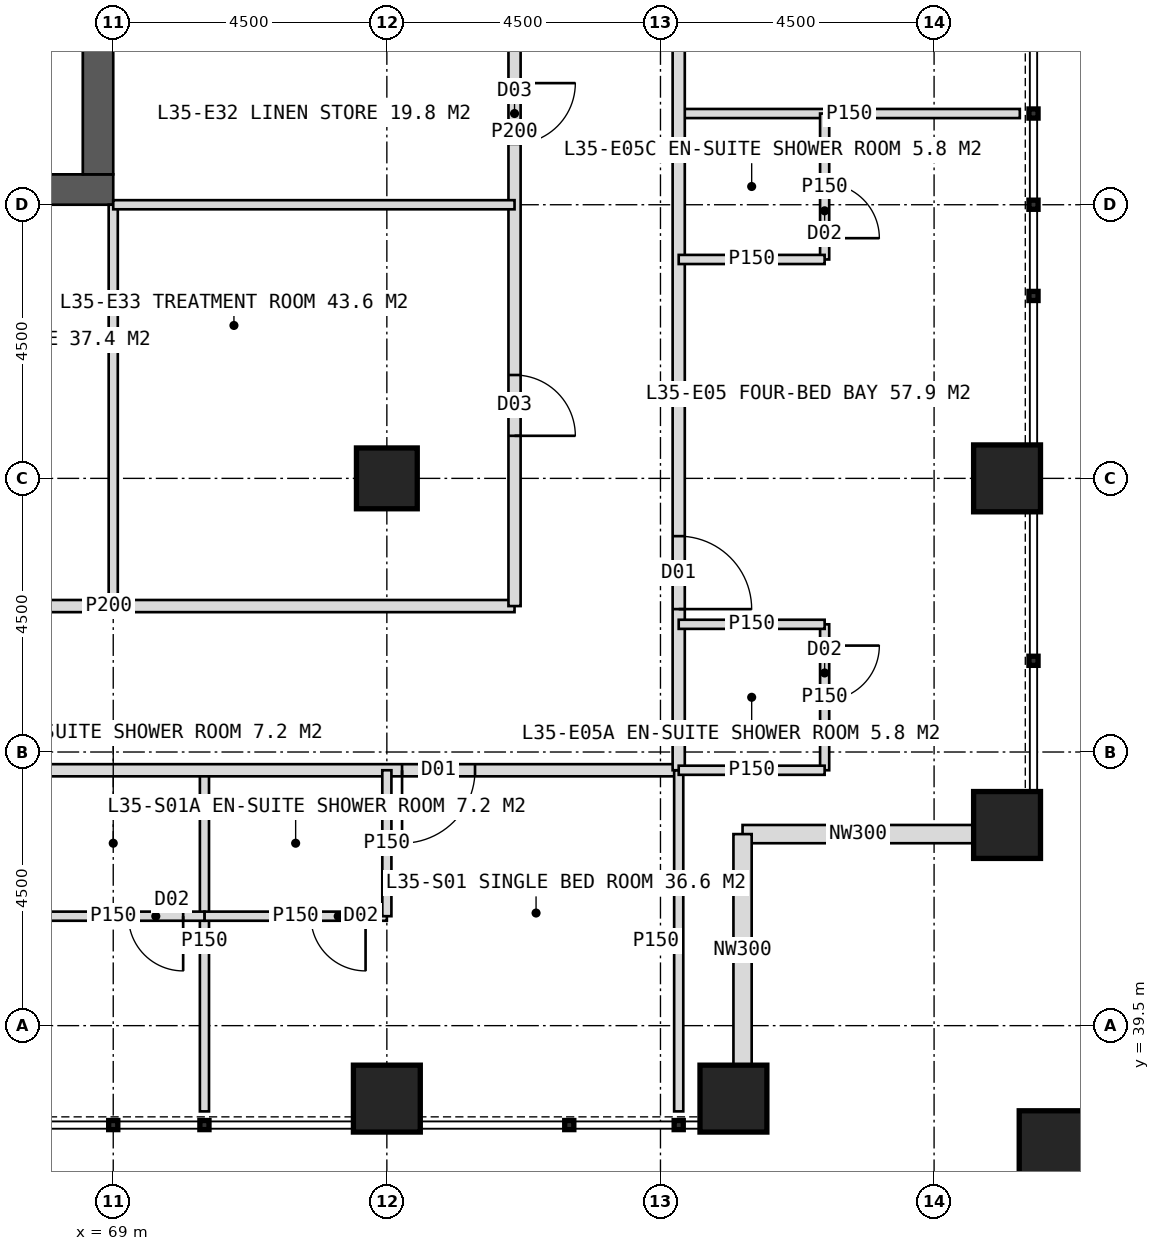
"""IFC4 building model, lengths in metres.
Left out: names, types, materials, properties, quantities, classifications, styles, units other than length and angle.
Written with IfcOpenShell. Run it as: python <this file> out.ifc"""

import sys

from ifc_helpers import new_model, si_unit, direction, frame, frame_2d, origin, origin_2d, place, context, subcontext, project, spatial, rectangle, hollow_rectangle, extrude, element, fill, save


model = new_model("IFC4")
c1 = context("Model", 3, precision=1e-05, world=origin(), true_north=direction((0.0, 1.0)))
c2 = subcontext(c1, "Body", "Model", "MODEL_VIEW")
j1 = project(units=[si_unit("LENGTHUNIT", "METRE"), si_unit("PLANEANGLEUNIT", "RADIAN")], contexts=[c1])
p1 = place(None, origin())
s1 = spatial("IfcSite", under=j1, at=p1, CompositionType="ELEMENT")
p2 = place(p1, origin())
s2 = spatial("IfcBuilding", under=s1, at=p2, CompositionType="ELEMENT")
p3 = place(p2, frame((0.0, 0.0, 148.0)))
s3 = spatial("IfcBuildingStorey", under=s2, at=p3, CompositionType="ELEMENT", Elevation=148.0)
p4 = place(p3, frame((51.0, 53.25, 0.0), z_axis=(0.0, 0.0, 1.0), x_axis=(1.0, 0.0, 0.0)))
e1 = element("IfcWall", 1, at=p4, inside=s3, PredefinedType="SHEAR", context=c2, shape_type="SweptSolid", body=[
    extrude(rectangle(XDim=18.0, YDim=0.5, at=frame_2d((9.0, 0.0))), origin(), (0.0, 0.0, 1.0), 4.0),
])
p5 = place(p4, frame((8.1, 0.0, 0.0)))
e2 = element("IfcOpeningElement", 2, at=p5, cuts=e1, PredefinedType="OPENING", context=c2, shape_type="SweptSolid", body=[
    extrude(rectangle(XDim=1.8, YDim=2.2, at=frame_2d((0.9, 1.1))), frame((0.0, 0.26, 0.0), z_axis=(0.0, -1.0, 0.0), x_axis=(1.0, 0.0, 0.0)), (0.0, 0.0, 1.0), 0.52),
])
p6 = place(p3, frame((68.75, 53.5, 0.0), z_axis=(0.0, 0.0, 1.0), x_axis=(0.0, 1.0, 0.0)))
e3 = element("IfcWall", 3, at=p6, inside=s3, PredefinedType="SHEAR", context=c2, shape_type="SweptSolid", body=[
    extrude(rectangle(XDim=17.0, YDim=0.5, at=frame_2d((8.5, 0.0))), origin(), (0.0, 0.0, 1.0), 4.0),
])
p7 = place(p6, frame((9.5, 0.0, 0.0)))
e4 = element("IfcOpeningElement", 4, at=p7, cuts=e3, PredefinedType="OPENING", context=c2, shape_type="SweptSolid", body=[
    extrude(rectangle(XDim=1.5, YDim=2.2, at=frame_2d((0.75, 1.1))), frame((0.0, 0.26, 0.0), z_axis=(0.0, -1.0, 0.0), x_axis=(1.0, 0.0, 0.0)), (0.0, 0.0, 1.0), 0.52),
])
p8 = place(p3, frame((73.5, 48.5, 0.0), z_axis=(0.0, 0.0, 1.0), x_axis=(1.0, 0.0, 0.0)))
e5 = element("IfcColumn", 5, at=p8, inside=s3, PredefinedType="COLUMN", context=c2, shape_type="SweptSolid", body=[
    extrude(hollow_rectangle(XDim=1.0, YDim=1.0, WallThickness=0.1, at=origin_2d()), origin(), (0.0, 0.0, 1.0), 4.0),
])
for number, where, z_axis, x_axis in (
    (6, (83.7, 42.8, 0.0), (0.0, 0.0, 1.0), (1.0, 0.0, 0.0)),
    (7, (83.7, 48.5, 0.0), (0.0, 0.0, 1.0), (1.0, 0.0, 0.0)),
    (8, (73.5, 38.3, 0.0), (0.0, 0.0, 1.0), (1.0, 0.0, 0.0)),
    (9, (79.2, 38.3, 0.0), (0.0, 0.0, 1.0), (1.0, 0.0, 0.0)),
):
    element("IfcColumn", number, at=place(p3, frame(where, z_axis=z_axis, x_axis=x_axis)), inside=s3, PredefinedType="COLUMN", context=c2, shape_type="SweptSolid", body=[
        extrude(hollow_rectangle(XDim=1.1, YDim=1.1, WallThickness=0.1, at=origin_2d()), origin(), (0.0, 0.0, 1.0), 4.0),
    ])
p9 = place(p3, frame((84.6, 37.4, 0.0), z_axis=(0.0, 0.0, 1.0), x_axis=(1.0, 0.0, 0.0)))
e10 = element("IfcColumn", 10, at=p9, inside=s3, PredefinedType="COLUMN", context=c2, shape_type="SweptSolid", body=[
    extrude(hollow_rectangle(XDim=1.4, YDim=1.4, WallThickness=0.08, at=origin_2d()), origin(), (0.0, 0.0, 1.0), 4.0),
])
for number, where, z_axis, x_axis in (
    (11, (83.15, 42.65, 0.0), (0.0, 0.0, 1.0), (-1.0, 0.0, 0.0)),
    (12, (79.35, 42.65, 0.0), (0.0, 0.0, 1.0), (0.0, -1.0, 0.0)),
):
    element("IfcWall", number, at=place(p3, frame(where, z_axis=z_axis, x_axis=x_axis)), inside=s3, PredefinedType="ELEMENTEDWALL", context=c2, shape_type="SweptSolid", body=[
        extrude(rectangle(XDim=3.8, YDim=0.3, at=frame_2d((1.9, 0.0))), origin(), (0.0, 0.0, 1.0), 4.0),
    ])
p10 = place(p3, frame((70.5, 43.7, 0.0), z_axis=(0.0, 0.0, 1.0), x_axis=(0.0, -1.0, 0.0)))
e13 = element("IfcWall", 13, at=p10, inside=s3, PredefinedType="PARTITIONING", context=c2, shape_type="SweptSolid", body=[
    extrude(rectangle(XDim=5.61, YDim=0.15, at=frame_2d((2.805, 0.0))), origin(), (0.0, 0.0, 1.0), 3.75),
])
p11 = place(p3, frame((78.3, 43.7, 0.0), z_axis=(0.0, 0.0, 1.0), x_axis=(-1.0, 0.0, 0.0)))
e14 = element("IfcWall", 14, at=p11, inside=s3, PredefinedType="PARTITIONING", context=c2, shape_type="SweptSolid", body=[
    extrude(rectangle(XDim=36.6, YDim=0.2, at=frame_2d((18.3, 0.0))), origin(), (0.0, 0.0, 1.0), 3.75),
])
p12 = place(p11, frame((3.35, 0.0, 0.0)))
e15 = element("IfcOpeningElement", 15, at=p12, cuts=e14, PredefinedType="OPENING", context=c2, shape_type="SweptSolid", body=[
    extrude(rectangle(XDim=1.2, YDim=2.2, at=frame_2d((0.6, 1.1))), frame((0.0, 0.11, 0.0), z_axis=(0.0, -1.0, 0.0), x_axis=(1.0, 0.0, 0.0)), (0.0, 0.0, 1.0), 0.22),
])
p13 = place(p11, frame((11.05, 0.0, 0.0)))
e16 = element("IfcOpeningElement", 16, at=p13, cuts=e14, PredefinedType="OPENING", context=c2, shape_type="SweptSolid", body=[
    extrude(rectangle(XDim=1.2, YDim=2.2, at=frame_2d((0.6, 1.1))), frame((0.0, 0.11, 0.0), z_axis=(0.0, -1.0, 0.0), x_axis=(1.0, 0.0, 0.0)), (0.0, 0.0, 1.0), 0.22),
])
p14 = place(p11, frame((19.85, 0.0, 0.0)))
e17 = element("IfcOpeningElement", 17, at=p14, cuts=e14, PredefinedType="OPENING", context=c2, shape_type="SweptSolid", body=[
    extrude(rectangle(XDim=1.2, YDim=2.2, at=frame_2d((0.6, 1.1))), frame((0.0, 0.11, 0.0), z_axis=(0.0, -1.0, 0.0), x_axis=(1.0, 0.0, 0.0)), (0.0, 0.0, 1.0), 0.22),
])
p15 = place(p11, frame((26.95, 0.0, 0.0)))
e18 = element("IfcOpeningElement", 18, at=p15, cuts=e14, PredefinedType="OPENING", context=c2, shape_type="SweptSolid", body=[
    extrude(rectangle(XDim=1.2, YDim=2.2, at=frame_2d((0.6, 1.1))), frame((0.0, 0.11, 0.0), z_axis=(0.0, -1.0, 0.0), x_axis=(1.0, 0.0, 0.0)), (0.0, 0.0, 1.0), 0.22),
])
p16 = place(p3, frame((78.3, 43.7, 0.0), z_axis=(0.0, 0.0, 1.0), x_axis=(0.0, -1.0, 0.0)))
e19 = element("IfcWall", 19, at=p16, inside=s3, PredefinedType="PARTITIONING", context=c2, shape_type="SweptSolid", body=[
    extrude(rectangle(XDim=5.61, YDim=0.15, at=frame_2d((2.805, 0.0))), origin(), (0.0, 0.0, 1.0), 3.75),
])
p17 = place(p3, frame((73.5, 41.3, 0.0), z_axis=(0.0, 0.0, 1.0), x_axis=(-1.0, 0.0, 0.0)))
e20 = element("IfcWall", 20, at=p17, inside=s3, PredefinedType="PARTITIONING", context=c2, shape_type="SweptSolid", body=[
    extrude(rectangle(XDim=3.0, YDim=0.15, at=frame_2d((1.5, 0.0))), origin(), (0.0, 0.0, 1.0), 3.75),
])
p18 = place(p17, frame((0.35, 0.0, 0.0)))
e21 = element("IfcOpeningElement", 21, at=p18, cuts=e20, PredefinedType="OPENING", context=c2, shape_type="SweptSolid", body=[
    extrude(rectangle(XDim=0.9, YDim=2.1, at=frame_2d((0.45, 1.05))), frame((0.0, 0.085, 0.0), z_axis=(0.0, -1.0, 0.0), x_axis=(1.0, 0.0, 0.0)), (0.0, 0.0, 1.0), 0.17),
])
p19 = place(p3, frame((73.5, 43.7, 0.0), z_axis=(0.0, 0.0, 1.0), x_axis=(0.0, -1.0, 0.0)))
e22 = element("IfcWall", 22, at=p19, inside=s3, PredefinedType="PARTITIONING", context=c2, shape_type="SweptSolid", body=[
    extrude(rectangle(XDim=2.4, YDim=0.15, at=frame_2d((1.2, 0.0))), origin(), (0.0, 0.0, 1.0), 2.95),
])
p20 = place(p3, frame((70.5, 41.3, 0.0), z_axis=(0.0, 0.0, 1.0), x_axis=(-1.0, 0.0, 0.0)))
e23 = element("IfcWall", 23, at=p20, inside=s3, PredefinedType="PARTITIONING", context=c2, shape_type="SweptSolid", body=[
    extrude(rectangle(XDim=3.0, YDim=0.15, at=frame_2d((1.5, 0.0))), origin(), (0.0, 0.0, 1.0), 3.75),
])
p21 = place(p20, frame((0.35, 0.0, 0.0)))
e24 = element("IfcOpeningElement", 24, at=p21, cuts=e23, PredefinedType="OPENING", context=c2, shape_type="SweptSolid", body=[
    extrude(rectangle(XDim=0.9, YDim=2.1, at=frame_2d((0.45, 1.05))), frame((0.0, 0.085, 0.0), z_axis=(0.0, -1.0, 0.0), x_axis=(1.0, 0.0, 0.0)), (0.0, 0.0, 1.0), 0.17),
])
p22 = place(p3, frame((69.0, 53.0, 0.0), z_axis=(0.0, 0.0, 1.0), x_axis=(0.0, -1.0, 0.0)))
e25 = element("IfcWall", 25, at=p22, inside=s3, PredefinedType="PARTITIONING", context=c2, shape_type="SweptSolid", body=[
    extrude(rectangle(XDim=6.6, YDim=0.15, at=frame_2d((3.3, 0.0))), origin(), (0.0, 0.0, 1.0), 3.75),
])
p23 = place(p3, frame((75.6, 46.4, 0.0), z_axis=(0.0, 0.0, 1.0), x_axis=(-1.0, 0.0, 0.0)))
e26 = element("IfcWall", 26, at=p23, inside=s3, PredefinedType="PARTITIONING", context=c2, shape_type="SweptSolid", body=[
    extrude(rectangle(XDim=13.35, YDim=0.2, at=frame_2d((6.675, 0.0))), origin(), (0.0, 0.0, 1.0), 3.75),
])
p24 = place(p23, frame((9.475, 0.0, 0.0)))
e27 = element("IfcOpeningElement", 27, at=p24, cuts=e26, PredefinedType="OPENING", context=c2, shape_type="SweptSolid", body=[
    extrude(rectangle(XDim=1.0, YDim=2.1, at=frame_2d((0.5, 1.05))), frame((0.0, 0.11, 0.0), z_axis=(0.0, -1.0, 0.0), x_axis=(1.0, 0.0, 0.0)), (0.0, 0.0, 1.0), 0.22),
])
p25 = place(p3, frame((78.3, 54.5, 0.0), z_axis=(0.0, 0.0, 1.0), x_axis=(1.0, 0.0, 0.0)))
e28 = element("IfcWall", 28, at=p25, inside=s3, PredefinedType="PARTITIONING", context=c2, shape_type="SweptSolid", body=[
    extrude(rectangle(XDim=5.61, YDim=0.15, at=frame_2d((2.805, 0.0))), origin(), (0.0, 0.0, 1.0), 3.75),
])
p26 = place(p3, frame((78.3, 80.3, 0.0), z_axis=(0.0, 0.0, 1.0), x_axis=(0.0, -1.0, 0.0)))
e29 = element("IfcWall", 29, at=p26, inside=s3, PredefinedType="PARTITIONING", context=c2, shape_type="SweptSolid", body=[
    extrude(rectangle(XDim=36.6, YDim=0.2, at=frame_2d((18.3, 0.0))), origin(), (0.0, 0.0, 1.0), 3.75),
])
p27 = place(p26, frame((3.35, 0.0, 0.0)))
e30 = element("IfcOpeningElement", 30, at=p27, cuts=e29, PredefinedType="OPENING", context=c2, shape_type="SweptSolid", body=[
    extrude(rectangle(XDim=1.2, YDim=2.2, at=frame_2d((0.6, 1.1))), frame((0.0, 0.11, 0.0), z_axis=(0.0, -1.0, 0.0), x_axis=(1.0, 0.0, 0.0)), (0.0, 0.0, 1.0), 0.22),
])
p28 = place(p26, frame((11.05, 0.0, 0.0)))
e31 = element("IfcOpeningElement", 31, at=p28, cuts=e29, PredefinedType="OPENING", context=c2, shape_type="SweptSolid", body=[
    extrude(rectangle(XDim=1.2, YDim=2.2, at=frame_2d((0.6, 1.1))), frame((0.0, 0.11, 0.0), z_axis=(0.0, -1.0, 0.0), x_axis=(1.0, 0.0, 0.0)), (0.0, 0.0, 1.0), 0.22),
])
p29 = place(p26, frame((16.3, 0.0, 0.0)))
e32 = element("IfcOpeningElement", 32, at=p29, cuts=e29, PredefinedType="OPENING", context=c2, shape_type="SweptSolid", body=[
    extrude(rectangle(XDim=1.0, YDim=2.1, at=frame_2d((0.5, 1.05))), frame((0.0, 0.11, 0.0), z_axis=(0.0, -1.0, 0.0), x_axis=(1.0, 0.0, 0.0)), (0.0, 0.0, 1.0), 0.22),
])
p30 = place(p26, frame((21.55, 0.0, 0.0)))
e33 = element("IfcOpeningElement", 33, at=p30, cuts=e29, PredefinedType="OPENING", context=c2, shape_type="SweptSolid", body=[
    extrude(rectangle(XDim=1.2, YDim=2.2, at=frame_2d((0.6, 1.1))), frame((0.0, 0.11, 0.0), z_axis=(0.0, -1.0, 0.0), x_axis=(1.0, 0.0, 0.0)), (0.0, 0.0, 1.0), 0.22),
])
p31 = place(p26, frame((32.75, 0.0, 0.0)))
e34 = element("IfcOpeningElement", 34, at=p31, cuts=e29, PredefinedType="OPENING", context=c2, shape_type="SweptSolid", body=[
    extrude(rectangle(XDim=1.2, YDim=2.2, at=frame_2d((0.6, 1.1))), frame((0.0, 0.11, 0.0), z_axis=(0.0, -1.0, 0.0), x_axis=(1.0, 0.0, 0.0)), (0.0, 0.0, 1.0), 0.22),
])
p32 = place(p3, frame((80.7, 46.1, 0.0), z_axis=(0.0, 0.0, 1.0), x_axis=(0.0, -1.0, 0.0)))
e35 = element("IfcWall", 35, at=p32, inside=s3, PredefinedType="PARTITIONING", context=c2, shape_type="SweptSolid", body=[
    extrude(rectangle(XDim=2.4, YDim=0.15, at=frame_2d((1.2, 0.0))), origin(), (0.0, 0.0, 1.0), 3.75),
])
p33 = place(p32, frame((0.35, 0.0, 0.0)))
e36 = element("IfcOpeningElement", 36, at=p33, cuts=e35, PredefinedType="OPENING", context=c2, shape_type="SweptSolid", body=[
    extrude(rectangle(XDim=0.9, YDim=2.1, at=frame_2d((0.45, 1.05))), frame((0.0, 0.085, 0.0), z_axis=(0.0, -1.0, 0.0), x_axis=(1.0, 0.0, 0.0)), (0.0, 0.0, 1.0), 0.17),
])
p34 = place(p3, frame((78.3, 46.1, 0.0), z_axis=(0.0, 0.0, 1.0), x_axis=(1.0, 0.0, 0.0)))
e37 = element("IfcWall", 37, at=p34, inside=s3, PredefinedType="PARTITIONING", context=c2, shape_type="SweptSolid", body=[
    extrude(rectangle(XDim=2.4, YDim=0.15, at=frame_2d((1.2, 0.0))), origin(), (0.0, 0.0, 1.0), 3.75),
])
p35 = place(p3, frame((80.7, 54.5, 0.0), z_axis=(0.0, 0.0, 1.0), x_axis=(0.0, -1.0, 0.0)))
e38 = element("IfcWall", 38, at=p35, inside=s3, PredefinedType="PARTITIONING", context=c2, shape_type="SweptSolid", body=[
    extrude(rectangle(XDim=2.4, YDim=0.15, at=frame_2d((1.2, 0.0))), origin(), (0.0, 0.0, 1.0), 3.75),
])
p36 = place(p35, frame((1.15, 0.0, 0.0)))
e39 = element("IfcOpeningElement", 39, at=p36, cuts=e38, PredefinedType="OPENING", context=c2, shape_type="SweptSolid", body=[
    extrude(rectangle(XDim=0.9, YDim=2.1, at=frame_2d((0.45, 1.05))), frame((0.0, 0.085, 0.0), z_axis=(0.0, -1.0, 0.0), x_axis=(1.0, 0.0, 0.0)), (0.0, 0.0, 1.0), 0.17),
])
for number, where, z_axis, x_axis in (
    (40, (78.3, 52.1, 0.0), (0.0, 0.0, 1.0), (1.0, 0.0, 0.0)),
    (41, (78.3, 43.7, 0.0), (0.0, 0.0, 1.0), (1.0, 0.0, 0.0)),
):
    element("IfcWall", number, at=place(p3, frame(where, z_axis=z_axis, x_axis=x_axis)), inside=s3, PredefinedType="PARTITIONING", context=c2, shape_type="SweptSolid", body=[
        extrude(rectangle(XDim=2.4, YDim=0.15, at=frame_2d((1.2, 0.0))), origin(), (0.0, 0.0, 1.0), 3.75),
    ])
p37 = place(p3, frame((75.6, 62.0, 0.0), z_axis=(0.0, 0.0, 1.0), x_axis=(0.0, -1.0, 0.0)))
e42 = element("IfcWall", 42, at=p37, inside=s3, PredefinedType="PARTITIONING", context=c2, shape_type="SweptSolid", body=[
    extrude(rectangle(XDim=15.6, YDim=0.2, at=frame_2d((7.8, 0.0))), origin(), (0.0, 0.0, 1.0), 3.75),
])
p38 = place(p37, frame((2.5, 0.0, 0.0)))
e43 = element("IfcOpeningElement", 43, at=p38, cuts=e42, PredefinedType="OPENING", context=c2, shape_type="SweptSolid", body=[
    extrude(rectangle(XDim=1.0, YDim=2.1, at=frame_2d((0.5, 1.05))), frame((0.0, 0.11, 0.0), z_axis=(0.0, -1.0, 0.0), x_axis=(1.0, 0.0, 0.0)), (0.0, 0.0, 1.0), 0.22),
])
p39 = place(p37, frame((7.0, 0.0, 0.0)))
e44 = element("IfcOpeningElement", 44, at=p39, cuts=e42, PredefinedType="OPENING", context=c2, shape_type="SweptSolid", body=[
    extrude(rectangle(XDim=1.0, YDim=2.1, at=frame_2d((0.5, 1.05))), frame((0.0, 0.11, 0.0), z_axis=(0.0, -1.0, 0.0), x_axis=(1.0, 0.0, 0.0)), (0.0, 0.0, 1.0), 0.22),
])
p40 = place(p37, frame((11.8, 0.0, 0.0)))
e45 = element("IfcOpeningElement", 45, at=p40, cuts=e42, PredefinedType="OPENING", context=c2, shape_type="SweptSolid", body=[
    extrude(rectangle(XDim=1.0, YDim=2.1, at=frame_2d((0.5, 1.05))), frame((0.0, 0.11, 0.0), z_axis=(0.0, -1.0, 0.0), x_axis=(1.0, 0.0, 0.0)), (0.0, 0.0, 1.0), 0.22),
])
p41 = place(p3, frame((69.0, 53.0, 0.0), z_axis=(0.0, 0.0, 1.0), x_axis=(1.0, 0.0, 0.0)))
e46 = element("IfcWall", 46, at=p41, inside=s3, PredefinedType="PARTITIONING", context=c2, shape_type="SweptSolid", body=[
    extrude(rectangle(XDim=6.6, YDim=0.15, at=frame_2d((3.3, 0.0))), origin(), (0.0, 0.0, 1.0), 3.75),
])
p42 = place(p12, origin())
e47 = element("IfcDoor", 47, at=p42, inside=s3, OperationType="SINGLE_SWING_RIGHT", PredefinedType="DOOR", context=c2, shape_type="SweptSolid", body=[
    extrude(rectangle(XDim=1.2, YDim=2.2, at=frame_2d((0.6, 1.1))), frame((0.0, 0.025, 0.0), z_axis=(0.0, -1.0, 0.0), x_axis=(1.0, 0.0, 0.0)), (0.0, 0.0, 1.0), 0.05),
])
fill(e15, e47)
p43 = place(p18, origin())
e48 = element("IfcDoor", 48, at=p43, inside=s3, OperationType="SINGLE_SWING_LEFT", PredefinedType="DOOR", context=c2, shape_type="SweptSolid", body=[
    extrude(rectangle(XDim=0.9, YDim=2.1, at=frame_2d((0.45, 1.05))), frame((0.0, 0.025, 0.0), z_axis=(0.0, -1.0, 0.0), x_axis=(1.0, 0.0, 0.0)), (0.0, 0.0, 1.0), 0.05),
])
fill(e21, e48)
p44 = place(p21, origin())
e49 = element("IfcDoor", 49, at=p44, inside=s3, OperationType="SINGLE_SWING_LEFT", PredefinedType="DOOR", context=c2, shape_type="SweptSolid", body=[
    extrude(rectangle(XDim=0.9, YDim=2.1, at=frame_2d((0.45, 1.05))), frame((0.0, 0.025, 0.0), z_axis=(0.0, -1.0, 0.0), x_axis=(1.0, 0.0, 0.0)), (0.0, 0.0, 1.0), 0.05),
])
fill(e24, e49)
p45 = place(p31, origin())
e50 = element("IfcDoor", 50, at=p45, inside=s3, OperationType="SINGLE_SWING_RIGHT", PredefinedType="DOOR", context=c2, shape_type="SweptSolid", body=[
    extrude(rectangle(XDim=1.2, YDim=2.2, at=frame_2d((0.6, 1.1))), frame((0.0, 0.025, 0.0), z_axis=(0.0, -1.0, 0.0), x_axis=(1.0, 0.0, 0.0)), (0.0, 0.0, 1.0), 0.05),
])
fill(e34, e50)
p46 = place(p33, origin())
e51 = element("IfcDoor", 51, at=p46, inside=s3, OperationType="SINGLE_SWING_LEFT", PredefinedType="DOOR", context=c2, shape_type="SweptSolid", body=[
    extrude(rectangle(XDim=0.9, YDim=2.1, at=frame_2d((0.45, 1.05))), frame((0.0, 0.025, 0.0), z_axis=(0.0, -1.0, 0.0), x_axis=(1.0, 0.0, 0.0)), (0.0, 0.0, 1.0), 0.05),
])
fill(e36, e51)
p47 = place(p36, origin())
e52 = element("IfcDoor", 52, at=p47, inside=s3, OperationType="SINGLE_SWING_RIGHT", PredefinedType="DOOR", context=c2, shape_type="SweptSolid", body=[
    extrude(rectangle(XDim=0.9, YDim=2.1, at=frame_2d((0.45, 1.05))), frame((0.0, 0.025, 0.0), z_axis=(0.0, -1.0, 0.0), x_axis=(1.0, 0.0, 0.0)), (0.0, 0.0, 1.0), 0.05),
])
fill(e39, e52)
p48 = place(p39, origin())
e53 = element("IfcDoor", 53, at=p48, inside=s3, OperationType="SINGLE_SWING_LEFT", PredefinedType="DOOR", context=c2, shape_type="SweptSolid", body=[
    extrude(rectangle(XDim=1.0, YDim=2.1, at=frame_2d((0.5, 1.05))), frame((0.0, 0.025, 0.0), z_axis=(0.0, -1.0, 0.0), x_axis=(1.0, 0.0, 0.0)), (0.0, 0.0, 1.0), 0.05),
])
fill(e44, e53)
p49 = place(p40, origin())
e54 = element("IfcDoor", 54, at=p49, inside=s3, OperationType="SINGLE_SWING_RIGHT", PredefinedType="DOOR", context=c2, shape_type="SweptSolid", body=[
    extrude(rectangle(XDim=1.0, YDim=2.1, at=frame_2d((0.5, 1.05))), frame((0.0, 0.025, 0.0), z_axis=(0.0, -1.0, 0.0), x_axis=(1.0, 0.0, 0.0)), (0.0, 0.0, 1.0), 0.05),
])
fill(e45, e54)
save(model, sys.argv[1])
